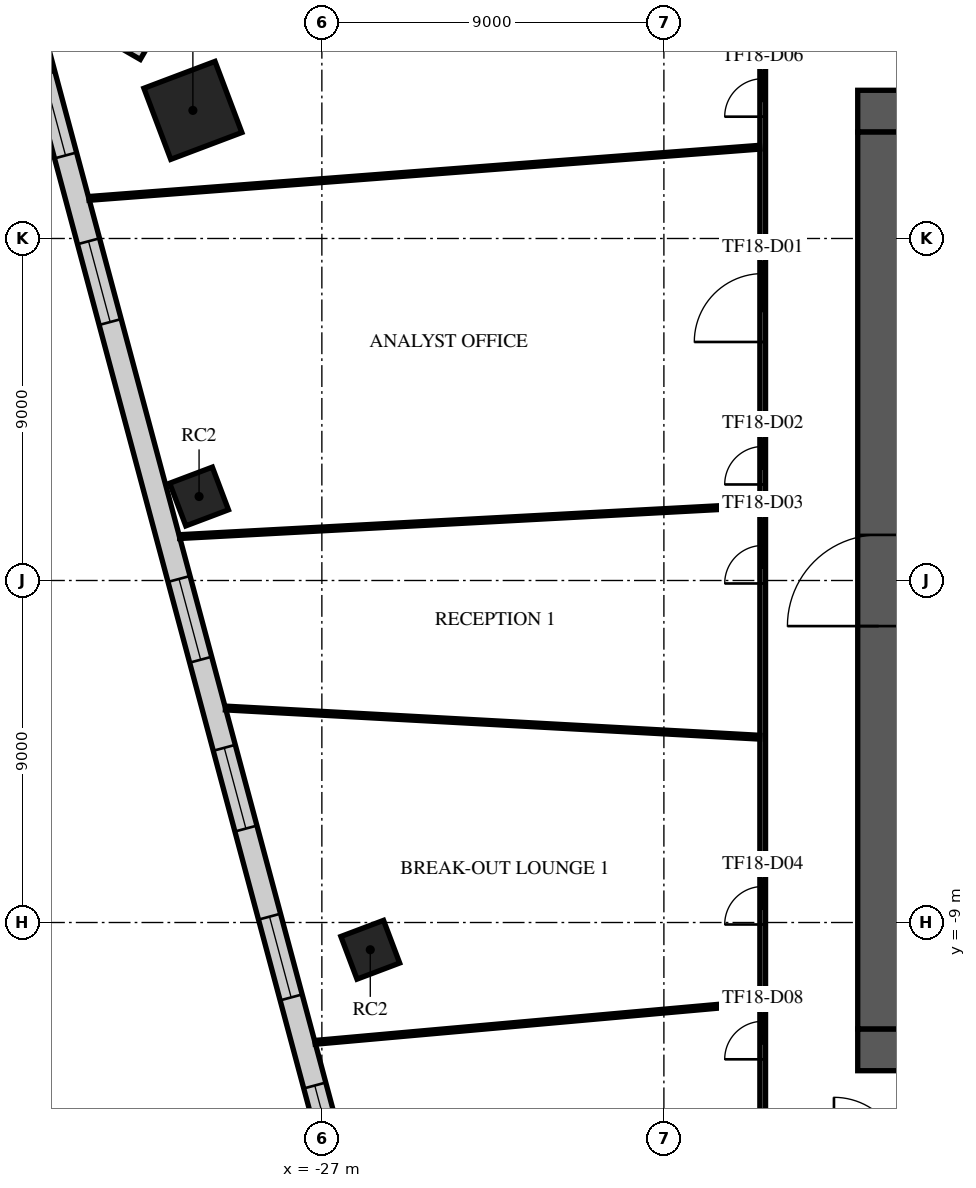
"""IFC4 building model, lengths in metres.
Left out: names, types, materials, properties, quantities, classifications, styles, units other than length and angle.
Written with IfcOpenShell. Run it as: python <this file> out.ifc"""

import sys

from ifc_helpers import new_model, si_unit, direction, frame, frame_2d, origin, origin_2d, place, context, subcontext, project, spatial, rectangle, extrude, element, fill, save


model = new_model("IFC4")
c1 = context("Model", 3, precision=1e-05, world=origin(), true_north=direction((0.0, 1.0)))
c2 = subcontext(c1, "Body", "Model", "MODEL_VIEW")
j1 = project(units=[si_unit("LENGTHUNIT", "METRE"), si_unit("PLANEANGLEUNIT", "RADIAN")], contexts=[c1])
p1 = place(None, origin())
s1 = spatial("IfcSite", under=j1, at=p1, CompositionType="ELEMENT")
p2 = place(p1, origin())
s2 = spatial("IfcBuilding", under=s1, at=p2, CompositionType="ELEMENT")
p3 = place(p2, frame((0.0, 0.0, 82.1)))
s3 = spatial("IfcBuildingStorey", under=s2, at=p3, CompositionType="ELEMENT", Elevation=82.1)
p4 = place(p3, frame((-30.394, 12.371, -0.42), z_axis=(0.0, 0.0, 1.0), x_axis=(0.935491525991, 0.353349125935, 0.0)))
e1 = element("IfcColumn", 1, at=p4, inside=s3, PredefinedType="COLUMN", context=c2, shape_type="SweptSolid", body=[
    extrude(rectangle(XDim=2.0, YDim=2.0, at=origin_2d()), origin(), (0.0, 0.0, 1.0), 4.42),
])
for number, where, z_axis, x_axis in (
    (2, (-30.231, 2.21, -0.42), (0.0, 0.0, 1.0), (0.935, 0.353, 0.0)),
    (3, (-25.726, -9.717, -0.42), (0.0, 0.0, 1.0), (0.935, 0.353, 0.0)),
):
    element("IfcColumn", number, at=place(p3, frame(where, z_axis=z_axis, x_axis=x_axis)), inside=s3, PredefinedType="COLUMN", context=c2, shape_type="SweptSolid", body=[
        extrude(rectangle(XDim=1.2, YDim=1.2, at=origin_2d()), origin(), (0.0, 0.0, 1.0), 4.42),
    ])
p5 = place(p3, frame((-12.9, 12.35, 0.0), z_axis=(0.0, 0.0, 1.0), x_axis=(1.0, 0.0, 0.0)))
e4 = element("IfcWall", 4, at=p5, inside=s3, PredefinedType="SHEAR", context=c2, shape_type="SweptSolid", body=[
    extrude(rectangle(XDim=25.8, YDim=1.1, at=frame_2d((12.9, 0.0))), origin(), (0.0, 0.0, 1.0), 3.58),
])
p6 = place(p5, frame((11.7, 0.0, 0.0)))
e5 = element("IfcOpeningElement", 5, at=p6, cuts=e4, PredefinedType="OPENING", context=c2, shape_type="SweptSolid", body=[
    extrude(rectangle(XDim=2.4, YDim=2.4, at=frame_2d((1.2, 1.2))), frame((0.0, 0.56, 0.0), z_axis=(0.0, -1.0, 0.0), x_axis=(1.0, 0.0, 0.0)), (0.0, 0.0, 1.0), 1.12),
])
p7 = place(p5, frame((22.525, 0.0, 0.0)))
e6 = element("IfcOpeningElement", 6, at=p7, cuts=e4, PredefinedType="OPENING", context=c2, shape_type="SweptSolid", body=[
    extrude(rectangle(XDim=1.2, YDim=2.1, at=frame_2d((0.6, 1.05))), frame((0.0, 0.56, 0.0), z_axis=(0.0, -1.0, 0.0), x_axis=(1.0, 0.0, 0.0)), (0.0, 0.0, 1.0), 1.12),
])
p8 = place(p5, frame((1.5, 0.0, 0.0)))
e7 = element("IfcOpeningElement", 7, at=p8, cuts=e4, PredefinedType="OPENING", context=c2, shape_type="SweptSolid", body=[
    extrude(rectangle(XDim=1.0, YDim=2.1, at=frame_2d((0.5, 1.05))), frame((0.0, 0.56, 0.0), z_axis=(0.0, -1.0, 0.0), x_axis=(1.0, 0.0, 0.0)), (0.0, 0.0, 1.0), 1.12),
])
p9 = place(p3, frame((-12.9, -12.35, 0.0), z_axis=(0.0, 0.0, 1.0), x_axis=(1.0, 0.0, 0.0)))
e8 = element("IfcWall", 8, at=p9, inside=s3, PredefinedType="SHEAR", context=c2, shape_type="SweptSolid", body=[
    extrude(rectangle(XDim=25.8, YDim=1.1, at=frame_2d((12.9, 0.0))), origin(), (0.0, 0.0, 1.0), 3.58),
])
p10 = place(p9, frame((7.8, 0.0, 0.0)))
e9 = element("IfcOpeningElement", 9, at=p10, cuts=e8, PredefinedType="OPENING", context=c2, shape_type="SweptSolid", body=[
    extrude(rectangle(XDim=2.0, YDim=2.1, at=frame_2d((1.0, 1.05))), frame((0.0, 0.56, 0.0), z_axis=(0.0, -1.0, 0.0), x_axis=(1.0, 0.0, 0.0)), (0.0, 0.0, 1.0), 1.12),
])
p11 = place(p9, frame((17.925, 0.0, 0.0)))
e10 = element("IfcOpeningElement", 10, at=p11, cuts=e8, PredefinedType="OPENING", context=c2, shape_type="SweptSolid", body=[
    extrude(rectangle(XDim=1.2, YDim=2.1, at=frame_2d((0.6, 1.05))), frame((0.0, 0.56, 0.0), z_axis=(0.0, -1.0, 0.0), x_axis=(1.0, 0.0, 0.0)), (0.0, 0.0, 1.0), 1.12),
])
p12 = place(p9, frame((2.075, 0.0, 0.0)))
e11 = element("IfcOpeningElement", 11, at=p12, cuts=e8, PredefinedType="OPENING", context=c2, shape_type="SweptSolid", body=[
    extrude(rectangle(XDim=1.2, YDim=2.1, at=frame_2d((0.6, 1.05))), frame((0.0, 0.56, 0.0), z_axis=(0.0, -1.0, 0.0), x_axis=(1.0, 0.0, 0.0)), (0.0, 0.0, 1.0), 1.12),
])
p13 = place(p9, frame((22.525, 0.0, 0.0)))
e12 = element("IfcOpeningElement", 12, at=p13, cuts=e8, PredefinedType="OPENING", context=c2, shape_type="SweptSolid", body=[
    extrude(rectangle(XDim=1.2, YDim=2.1, at=frame_2d((0.6, 1.05))), frame((0.0, 0.56, 0.0), z_axis=(0.0, -1.0, 0.0), x_axis=(1.0, 0.0, 0.0)), (0.0, 0.0, 1.0), 1.12),
])
p14 = place(p3, frame((-12.35, -11.8, 0.0), z_axis=(0.0, 0.0, 1.0), x_axis=(0.0, 1.0, 0.0)))
e13 = element("IfcWall", 13, at=p14, inside=s3, PredefinedType="SHEAR", context=c2, shape_type="SweptSolid", body=[
    extrude(rectangle(XDim=23.6, YDim=1.1, at=frame_2d((11.8, 0.0))), origin(), (0.0, 0.0, 1.0), 3.58),
])
p15 = place(p14, frame((10.6, 0.0, 0.0)))
e14 = element("IfcOpeningElement", 14, at=p15, cuts=e13, PredefinedType="OPENING", context=c2, shape_type="SweptSolid", body=[
    extrude(rectangle(XDim=2.4, YDim=2.4, at=frame_2d((1.2, 1.2))), frame((0.0, 0.56, 0.0), z_axis=(0.0, -1.0, 0.0), x_axis=(1.0, 0.0, 0.0)), (0.0, 0.0, 1.0), 1.12),
])
p16 = place(p3, frame((-31.628, 13.972, 0.0), z_axis=(0.0, 0.0, 1.0), x_axis=(-0.866022959057, 0.500004234368, 0.0)))
e15 = element("IfcWall", 15, at=p16, inside=s3, PredefinedType="STANDARD", context=c2, shape_type="SweptSolid", body=[
    extrude(rectangle(XDim=2.5, YDim=0.6, at=frame_2d((1.25, 0.0))), origin(), (0.0, 0.0, 1.0), 3.58),
])
p17 = place(p3, frame((-34.609, 14.409, 0.0), z_axis=(0.0, 0.0, 1.0), x_axis=(0.258818949408, -0.96592585193, 0.0)))
e16 = element("IfcWall", 16, at=p17, inside=s3, PredefinedType="STANDARD", context=c2, shape_type="SweptSolid", body=[
    extrude(rectangle(XDim=45.751, YDim=0.6, at=frame_2d((22.875, 0.0))), origin(), (0.0, 0.0, 1.0), 3.58),
])
p18 = place(p17, frame((1.138, 0.0, 0.9)))
e17 = element("IfcOpeningElement", 17, at=p18, cuts=e16, PredefinedType="OPENING", context=c2, shape_type="SweptSolid", body=[
    extrude(rectangle(XDim=2.2, YDim=2.1, at=frame_2d((1.1, 1.05))), frame((0.0, 0.31, 0.0), z_axis=(0.0, -1.0, 0.0), x_axis=(1.0, 0.0, 0.0)), (0.0, 0.0, 1.0), 0.62),
])
p19 = place(p17, frame((5.676, 0.0, 0.9)))
e18 = element("IfcOpeningElement", 18, at=p19, cuts=e16, PredefinedType="OPENING", context=c2, shape_type="SweptSolid", body=[
    extrude(rectangle(XDim=2.2, YDim=2.1, at=frame_2d((1.1, 1.05))), frame((0.0, 0.31, 0.0), z_axis=(0.0, -1.0, 0.0), x_axis=(1.0, 0.0, 0.0)), (0.0, 0.0, 1.0), 0.62),
])
p20 = place(p17, frame((14.876, 0.0, 0.9)))
e19 = element("IfcOpeningElement", 19, at=p20, cuts=e16, PredefinedType="OPENING", context=c2, shape_type="SweptSolid", body=[
    extrude(rectangle(XDim=2.2, YDim=2.1, at=frame_2d((1.1, 1.05))), frame((0.0, 0.31, 0.0), z_axis=(0.0, -1.0, 0.0), x_axis=(1.0, 0.0, 0.0)), (0.0, 0.0, 1.0), 0.62),
])
p21 = place(p17, frame((19.476, 0.0, 0.9)))
e20 = element("IfcOpeningElement", 20, at=p21, cuts=e16, PredefinedType="OPENING", context=c2, shape_type="SweptSolid", body=[
    extrude(rectangle(XDim=2.2, YDim=2.1, at=frame_2d((1.1, 1.05))), frame((0.0, 0.31, 0.0), z_axis=(0.0, -1.0, 0.0), x_axis=(1.0, 0.0, 0.0)), (0.0, 0.0, 1.0), 0.62),
])
p22 = place(p17, frame((24.076, 0.0, 0.9)))
e21 = element("IfcOpeningElement", 21, at=p22, cuts=e16, PredefinedType="OPENING", context=c2, shape_type="SweptSolid", body=[
    extrude(rectangle(XDim=2.2, YDim=2.1, at=frame_2d((1.1, 1.05))), frame((0.0, 0.31, 0.0), z_axis=(0.0, -1.0, 0.0), x_axis=(1.0, 0.0, 0.0)), (0.0, 0.0, 1.0), 0.62),
])
p23 = place(p17, frame((28.676, 0.0, 0.9)))
e22 = element("IfcOpeningElement", 22, at=p23, cuts=e16, PredefinedType="OPENING", context=c2, shape_type="SweptSolid", body=[
    extrude(rectangle(XDim=2.2, YDim=2.1, at=frame_2d((1.1, 1.05))), frame((0.0, 0.31, 0.0), z_axis=(0.0, -1.0, 0.0), x_axis=(1.0, 0.0, 0.0)), (0.0, 0.0, 1.0), 0.62),
])
p24 = place(p17, frame((33.276, 0.0, 0.9)))
e23 = element("IfcOpeningElement", 23, at=p24, cuts=e16, PredefinedType="OPENING", context=c2, shape_type="SweptSolid", body=[
    extrude(rectangle(XDim=2.2, YDim=2.1, at=frame_2d((1.1, 1.05))), frame((0.0, 0.31, 0.0), z_axis=(0.0, -1.0, 0.0), x_axis=(1.0, 0.0, 0.0)), (0.0, 0.0, 1.0), 0.62),
])
p25 = place(p17, frame((37.876, 0.0, 0.9)))
e24 = element("IfcOpeningElement", 24, at=p25, cuts=e16, PredefinedType="OPENING", context=c2, shape_type="SweptSolid", body=[
    extrude(rectangle(XDim=2.2, YDim=2.1, at=frame_2d((1.1, 1.05))), frame((0.0, 0.31, 0.0), z_axis=(0.0, -1.0, 0.0), x_axis=(1.0, 0.0, 0.0)), (0.0, 0.0, 1.0), 0.62),
])
p26 = place(p17, frame((42.414, 0.0, 0.9)))
e25 = element("IfcOpeningElement", 25, at=p26, cuts=e16, PredefinedType="OPENING", context=c2, shape_type="SweptSolid", body=[
    extrude(rectangle(XDim=2.2, YDim=2.1, at=frame_2d((1.1, 1.05))), frame((0.0, 0.31, 0.0), z_axis=(0.0, -1.0, 0.0), x_axis=(1.0, 0.0, 0.0)), (0.0, 0.0, 1.0), 0.62),
])
p27 = place(p3, frame((-15.4, -15.4, 0.0), z_axis=(0.0, 0.0, 1.0), x_axis=(0.0, 1.0, 0.0)))
e26 = element("IfcWall", 26, at=p27, inside=s3, PredefinedType="PARTITIONING", context=c2, shape_type="SweptSolid", body=[
    extrude(rectangle(XDim=30.8, YDim=0.15, at=frame_2d((15.4, 0.0))), origin(), (0.0, 0.0, 1.0), 3.08),
])
p28 = place(p27, frame((21.677, 0.0, 0.0)))
e27 = element("IfcOpeningElement", 27, at=p28, cuts=e26, PredefinedType="OPENING", context=c2, shape_type="SweptSolid", body=[
    extrude(rectangle(XDim=1.8, YDim=2.1, at=frame_2d((0.9, 1.05))), frame((0.0, 0.085, 0.0), z_axis=(0.0, -1.0, 0.0), x_axis=(1.0, 0.0, 0.0)), (0.0, 0.0, 1.0), 0.17),
])
p29 = place(p27, frame((17.927, 0.0, 0.0)))
e28 = element("IfcOpeningElement", 28, at=p29, cuts=e26, PredefinedType="OPENING", context=c2, shape_type="SweptSolid", body=[
    extrude(rectangle(XDim=1.0, YDim=2.1, at=frame_2d((0.5, 1.05))), frame((0.0, 0.085, 0.0), z_axis=(0.0, -1.0, 0.0), x_axis=(1.0, 0.0, 0.0)), (0.0, 0.0, 1.0), 0.17),
])
p30 = place(p27, frame((15.322, 0.0, 0.0)))
e29 = element("IfcOpeningElement", 29, at=p30, cuts=e26, PredefinedType="OPENING", context=c2, shape_type="SweptSolid", body=[
    extrude(rectangle(XDim=1.0, YDim=2.1, at=frame_2d((0.5, 1.05))), frame((0.0, 0.085, 0.0), z_axis=(0.0, -1.0, 0.0), x_axis=(1.0, 0.0, 0.0)), (0.0, 0.0, 1.0), 0.17),
])
p31 = place(p27, frame((6.348, 0.0, 0.0)))
e30 = element("IfcOpeningElement", 30, at=p31, cuts=e26, PredefinedType="OPENING", context=c2, shape_type="SweptSolid", body=[
    extrude(rectangle(XDim=1.0, YDim=2.1, at=frame_2d((0.5, 1.05))), frame((0.0, 0.085, 0.0), z_axis=(0.0, -1.0, 0.0), x_axis=(1.0, 0.0, 0.0)), (0.0, 0.0, 1.0), 0.17),
])
p32 = place(p27, frame((27.605, 0.0, 0.0)))
e31 = element("IfcOpeningElement", 31, at=p32, cuts=e26, PredefinedType="OPENING", context=c2, shape_type="SweptSolid", body=[
    extrude(rectangle(XDim=1.0, YDim=2.1, at=frame_2d((0.5, 1.05))), frame((0.0, 0.085, 0.0), z_axis=(0.0, -1.0, 0.0), x_axis=(1.0, 0.0, 0.0)), (0.0, 0.0, 1.0), 0.17),
])
p33 = place(p27, frame((2.8, 0.0, 0.0)))
e32 = element("IfcOpeningElement", 32, at=p33, cuts=e26, PredefinedType="OPENING", context=c2, shape_type="SweptSolid", body=[
    extrude(rectangle(XDim=1.0, YDim=2.1, at=frame_2d((0.5, 1.05))), frame((0.0, 0.085, 0.0), z_axis=(0.0, -1.0, 0.0), x_axis=(1.0, 0.0, 0.0)), (0.0, 0.0, 1.0), 0.17),
])
p34 = place(p3, frame((-33.129, 10.055, 0.0), z_axis=(0.0, 0.0, 1.0), x_axis=(0.997098857085, 0.076117469739, 0.0)))
e33 = element("IfcWall", 33, at=p34, inside=s3, PredefinedType="PARTITIONING", context=c2, shape_type="SweptSolid", body=[
    extrude(rectangle(XDim=17.702, YDim=0.1, at=frame_2d((8.851, 0.0))), origin(), (0.0, 0.0, 1.0), 3.58),
])
p35 = place(p3, frame((-30.744, 1.155, 0.0), z_axis=(0.0, 0.0, 1.0), x_axis=(0.998561238881, 0.053623243142, 0.0)))
e34 = element("IfcWall", 34, at=p35, inside=s3, PredefinedType="PARTITIONING", context=c2, shape_type="SweptSolid", body=[
    extrude(rectangle(XDim=15.289, YDim=0.1, at=frame_2d((7.644, 0.0))), origin(), (0.0, 0.0, 1.0), 2.96),
])
p36 = place(p3, frame((-29.536, -3.355, 0.0), z_axis=(0.0, 0.0, 1.0), x_axis=(0.998509889637, -0.054571057322, 0.0)))
e35 = element("IfcWall", 35, at=p36, inside=s3, PredefinedType="PARTITIONING", context=c2, shape_type="SweptSolid", body=[
    extrude(rectangle(XDim=14.079, YDim=0.1, at=frame_2d((7.04, 0.0))), origin(), (0.0, 0.0, 1.0), 3.08),
])
p37 = place(p3, frame((-27.178, -12.154, 0.0), z_axis=(0.0, 0.0, 1.0), x_axis=(0.996016470741, 0.089169445512, 0.0)))
e36 = element("IfcWall", 36, at=p37, inside=s3, PredefinedType="PARTITIONING", context=c2, shape_type="SweptSolid", body=[
    extrude(rectangle(XDim=11.746, YDim=0.1, at=frame_2d((5.873, 0.0))), origin(), (0.0, 0.0, 1.0), 3.58),
])
p38 = place(p15, origin())
e37 = element("IfcDoor", 37, at=p38, inside=s3, OperationType="SINGLE_SWING_LEFT", PredefinedType="DOOR", context=c2, shape_type="SweptSolid", body=[
    extrude(rectangle(XDim=2.4, YDim=2.4, at=frame_2d((1.2, 1.2))), frame((0.0, 0.025, 0.0), z_axis=(0.0, -1.0, 0.0), x_axis=(1.0, 0.0, 0.0)), (0.0, 0.0, 1.0), 0.05),
])
fill(e14, e37)
p39 = place(p18, origin())
e38 = element("IfcWindow", 38, at=p39, inside=s3, PartitioningType="SINGLE_PANEL", PredefinedType="WINDOW", context=c2, shape_type="SweptSolid", body=[
    extrude(rectangle(XDim=2.2, YDim=2.1, at=frame_2d((1.1, 1.05))), frame((0.0, 0.03, 0.0), z_axis=(0.0, -1.0, 0.0), x_axis=(1.0, 0.0, 0.0)), (0.0, 0.0, 1.0), 0.06),
])
fill(e17, e38)
p40 = place(p19, origin())
e39 = element("IfcWindow", 39, at=p40, inside=s3, PartitioningType="SINGLE_PANEL", PredefinedType="WINDOW", context=c2, shape_type="SweptSolid", body=[
    extrude(rectangle(XDim=2.2, YDim=2.1, at=frame_2d((1.1, 1.05))), frame((0.0, 0.03, 0.0), z_axis=(0.0, -1.0, 0.0), x_axis=(1.0, 0.0, 0.0)), (0.0, 0.0, 1.0), 0.06),
])
fill(e18, e39)
p41 = place(p20, origin())
e40 = element("IfcWindow", 40, at=p41, inside=s3, PartitioningType="SINGLE_PANEL", PredefinedType="WINDOW", context=c2, shape_type="SweptSolid", body=[
    extrude(rectangle(XDim=2.2, YDim=2.1, at=frame_2d((1.1, 1.05))), frame((0.0, 0.03, 0.0), z_axis=(0.0, -1.0, 0.0), x_axis=(1.0, 0.0, 0.0)), (0.0, 0.0, 1.0), 0.06),
])
fill(e19, e40)
p42 = place(p21, origin())
e41 = element("IfcWindow", 41, at=p42, inside=s3, PartitioningType="SINGLE_PANEL", PredefinedType="WINDOW", context=c2, shape_type="SweptSolid", body=[
    extrude(rectangle(XDim=2.2, YDim=2.1, at=frame_2d((1.1, 1.05))), frame((0.0, 0.03, 0.0), z_axis=(0.0, -1.0, 0.0), x_axis=(1.0, 0.0, 0.0)), (0.0, 0.0, 1.0), 0.06),
])
fill(e20, e41)
p43 = place(p22, origin())
e42 = element("IfcWindow", 42, at=p43, inside=s3, PartitioningType="SINGLE_PANEL", PredefinedType="WINDOW", context=c2, shape_type="SweptSolid", body=[
    extrude(rectangle(XDim=2.2, YDim=2.1, at=frame_2d((1.1, 1.05))), frame((0.0, 0.03, 0.0), z_axis=(0.0, -1.0, 0.0), x_axis=(1.0, 0.0, 0.0)), (0.0, 0.0, 1.0), 0.06),
])
fill(e21, e42)
p44 = place(p23, origin())
e43 = element("IfcWindow", 43, at=p44, inside=s3, PartitioningType="SINGLE_PANEL", PredefinedType="WINDOW", context=c2, shape_type="SweptSolid", body=[
    extrude(rectangle(XDim=2.2, YDim=2.1, at=frame_2d((1.1, 1.05))), frame((0.0, 0.03, 0.0), z_axis=(0.0, -1.0, 0.0), x_axis=(1.0, 0.0, 0.0)), (0.0, 0.0, 1.0), 0.06),
])
fill(e22, e43)
p45 = place(p28, origin())
e44 = element("IfcDoor", 44, at=p45, inside=s3, OperationType="DOUBLE_DOOR_SINGLE_SWING", PredefinedType="DOOR", context=c2, shape_type="SweptSolid", body=[
    extrude(rectangle(XDim=1.8, YDim=2.1, at=frame_2d((0.9, 1.05))), frame((0.0, 0.025, 0.0), z_axis=(0.0, -1.0, 0.0), x_axis=(1.0, 0.0, 0.0)), (0.0, 0.0, 1.0), 0.05),
])
fill(e27, e44)
p46 = place(p29, origin())
e45 = element("IfcDoor", 45, at=p46, inside=s3, OperationType="SINGLE_SWING_RIGHT", PredefinedType="DOOR", context=c2, shape_type="SweptSolid", body=[
    extrude(rectangle(XDim=1.0, YDim=2.1, at=frame_2d((0.5, 1.05))), frame((0.0, 0.025, 0.0), z_axis=(0.0, -1.0, 0.0), x_axis=(1.0, 0.0, 0.0)), (0.0, 0.0, 1.0), 0.05),
])
fill(e28, e45)
p47 = place(p30, origin())
e46 = element("IfcDoor", 46, at=p47, inside=s3, OperationType="SINGLE_SWING_LEFT", PredefinedType="DOOR", context=c2, shape_type="SweptSolid", body=[
    extrude(rectangle(XDim=1.0, YDim=2.1, at=frame_2d((0.5, 1.05))), frame((0.0, 0.025, 0.0), z_axis=(0.0, -1.0, 0.0), x_axis=(1.0, 0.0, 0.0)), (0.0, 0.0, 1.0), 0.05),
])
fill(e29, e46)
p48 = place(p31, origin())
e47 = element("IfcDoor", 47, at=p48, inside=s3, OperationType="SINGLE_SWING_RIGHT", PredefinedType="DOOR", context=c2, shape_type="SweptSolid", body=[
    extrude(rectangle(XDim=1.0, YDim=2.1, at=frame_2d((0.5, 1.05))), frame((0.0, 0.025, 0.0), z_axis=(0.0, -1.0, 0.0), x_axis=(1.0, 0.0, 0.0)), (0.0, 0.0, 1.0), 0.05),
])
fill(e30, e47)
p49 = place(p32, origin())
e48 = element("IfcDoor", 48, at=p49, inside=s3, OperationType="SINGLE_SWING_RIGHT", PredefinedType="DOOR", context=c2, shape_type="SweptSolid", body=[
    extrude(rectangle(XDim=1.0, YDim=2.1, at=frame_2d((0.5, 1.05))), frame((0.0, 0.025, 0.0), z_axis=(0.0, -1.0, 0.0), x_axis=(1.0, 0.0, 0.0)), (0.0, 0.0, 1.0), 0.05),
])
fill(e31, e48)
p50 = place(p33, origin())
e49 = element("IfcDoor", 49, at=p50, inside=s3, OperationType="SINGLE_SWING_LEFT", PredefinedType="DOOR", context=c2, shape_type="SweptSolid", body=[
    extrude(rectangle(XDim=1.0, YDim=2.1, at=frame_2d((0.5, 1.05))), frame((0.0, 0.025, 0.0), z_axis=(0.0, -1.0, 0.0), x_axis=(1.0, 0.0, 0.0)), (0.0, 0.0, 1.0), 0.05),
])
fill(e32, e49)
save(model, sys.argv[1])
